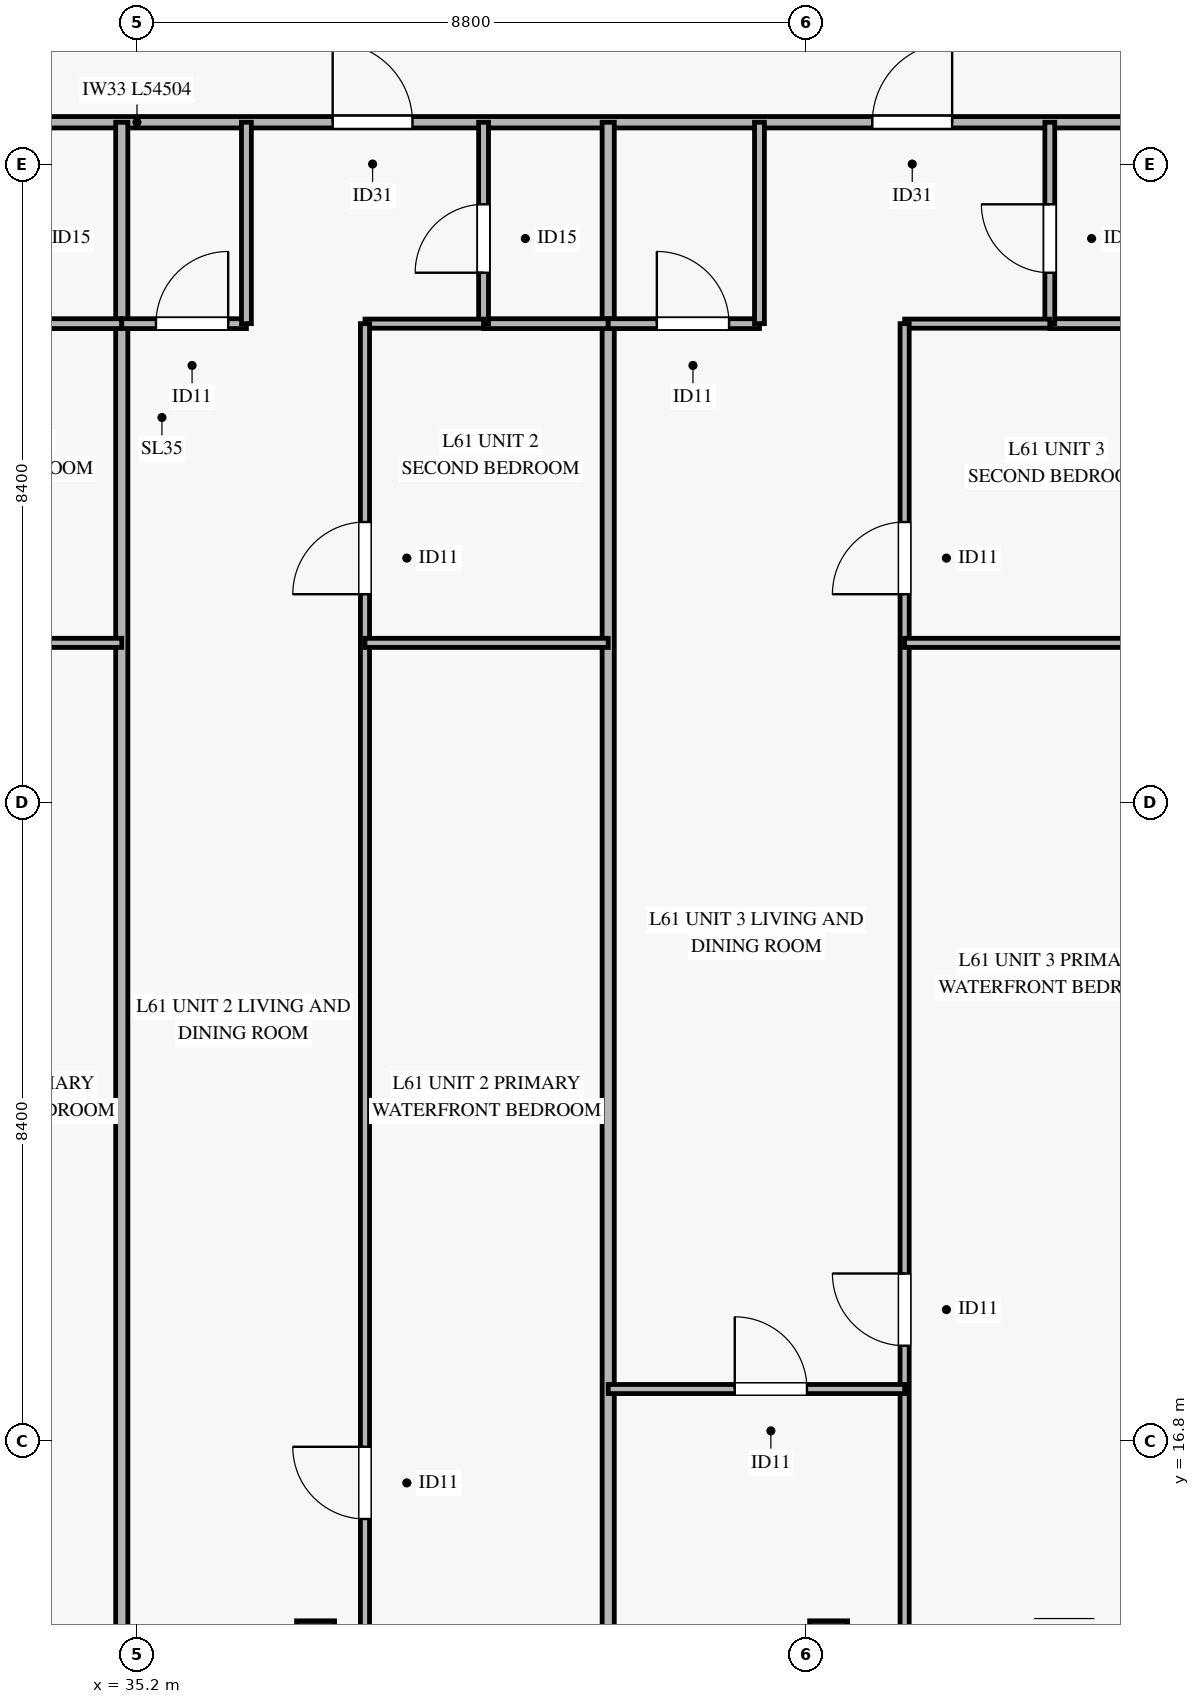
"""IFC4 building model, lengths in metres.
Left out: names, types, materials, properties, quantities, classifications, styles, units other than length and angle.
Written with IfcOpenShell. Run it as: python <this file> out.ifc"""

import sys

from ifc_helpers import new_model, si_unit, direction, frame, frame_2d, origin, origin_2d, place, context, subcontext, project, spatial, rectangle, hollow_rectangle, extrude, source, transform, mapped, element, fill, save


model = new_model("IFC4")
c1 = context("Model", 3, precision=1e-05, world=origin(), true_north=direction((0.0, 1.0)))
c2 = subcontext(c1, "Body", "Model", "MODEL_VIEW")
j1 = project(units=[si_unit("LENGTHUNIT", "METRE"), si_unit("PLANEANGLEUNIT", "RADIAN")], contexts=[c1])
p1 = place(None, origin())
s1 = spatial("IfcSite", under=j1, at=p1, CompositionType="ELEMENT")
p2 = place(p1, origin())
s2 = spatial("IfcBuilding", under=s1, at=p2, CompositionType="ELEMENT")
p3 = place(p2, frame((0.0, 0.0, 241.7)))
s3 = spatial("IfcBuildingStorey", under=s2, at=p3, CompositionType="ELEMENT", Elevation=241.7)
m1 = source(origin(), c2, "Body", "SweptSolid", [
    extrude(hollow_rectangle(XDim=0.5, YDim=0.5, WallThickness=0.024, at=origin_2d()), origin(), (0.0, 0.0, 1.0), 3.185),
])
for number, where, z_axis, x_axis in (
    (1, (37.55, 14.182, 0.0), (0.0, 0.0, 1.0), (1.0, 0.0, 0.0)),
    (2, (44.3, 14.182, 0.0), (0.0, 0.0, 1.0), (1.0, 0.0, 0.0)),
):
    element("IfcColumn", number, at=place(p3, frame(where, z_axis=z_axis, x_axis=x_axis)), inside=s3, PredefinedType="COLUMN", context=c2, shape_type="MappedRepresentation", body=[
        mapped(m1, transform((0.0, 0.0, 0.0), x_axis=(1.0, 0.0, 0.0), y_axis=(0.0, 1.0, 0.0), z_axis=(0.0, 0.0, 1.0), scale=1.0)),
    ])
p4 = place(p3, frame((7.948, 34.15, 0.0), z_axis=(0.0, 0.0, 1.0), x_axis=(1.0, 0.0, 0.0)))
e3 = element("IfcWall", 3, at=p4, inside=s3, PredefinedType="PARTITIONING", context=c2, shape_type="SweptSolid", body=[
    extrude(rectangle(XDim=54.504, YDim=0.15, at=frame_2d((27.252, 0.0))), origin(), (0.0, 0.0, 1.0), 2.47),
])
p5 = place(p4, frame((5.785, 0.0, 0.0)))
e4 = element("IfcOpeningElement", 4, at=p5, cuts=e3, PredefinedType="OPENING", context=c2, shape_type="SweptSolid", body=[
    extrude(rectangle(XDim=1.05, YDim=2.15, at=frame_2d((0.525, 1.075))), frame((0.0, 0.085, 0.0), z_axis=(0.0, -1.0, 0.0), x_axis=(1.0, 0.0, 0.0)), (0.0, 0.0, 1.0), 0.17),
])
p6 = place(p4, frame((16.977, 0.0, 0.0)))
e5 = element("IfcOpeningElement", 5, at=p6, cuts=e3, PredefinedType="OPENING", context=c2, shape_type="SweptSolid", body=[
    extrude(rectangle(XDim=1.05, YDim=2.15, at=frame_2d((0.525, 1.075))), frame((0.0, 0.085, 0.0), z_axis=(0.0, -1.0, 0.0), x_axis=(1.0, 0.0, 0.0)), (0.0, 0.0, 1.0), 0.17),
])
p7 = place(p4, frame((23.427, 0.0, 0.0)))
e6 = element("IfcOpeningElement", 6, at=p7, cuts=e3, PredefinedType="OPENING", context=c2, shape_type="SweptSolid", body=[
    extrude(rectangle(XDim=1.05, YDim=2.15, at=frame_2d((0.525, 1.075))), frame((0.0, 0.085, 0.0), z_axis=(0.0, -1.0, 0.0), x_axis=(1.0, 0.0, 0.0)), (0.0, 0.0, 1.0), 0.17),
])
p8 = place(p4, frame((29.827, 0.0, 0.0)))
e7 = element("IfcOpeningElement", 7, at=p8, cuts=e3, PredefinedType="OPENING", context=c2, shape_type="SweptSolid", body=[
    extrude(rectangle(XDim=1.05, YDim=2.15, at=frame_2d((0.525, 1.075))), frame((0.0, 0.085, 0.0), z_axis=(0.0, -1.0, 0.0), x_axis=(1.0, 0.0, 0.0)), (0.0, 0.0, 1.0), 0.17),
])
p9 = place(p4, frame((36.927, 0.0, 0.0)))
e8 = element("IfcOpeningElement", 8, at=p9, cuts=e3, PredefinedType="OPENING", context=c2, shape_type="SweptSolid", body=[
    extrude(rectangle(XDim=1.05, YDim=2.15, at=frame_2d((0.525, 1.075))), frame((0.0, 0.085, 0.0), z_axis=(0.0, -1.0, 0.0), x_axis=(1.0, 0.0, 0.0)), (0.0, 0.0, 1.0), 0.17),
])
p10 = place(p4, frame((46.381, 0.0, 0.0)))
e9 = element("IfcOpeningElement", 9, at=p10, cuts=e3, PredefinedType="OPENING", context=c2, shape_type="SweptSolid", body=[
    extrude(rectangle(XDim=1.05, YDim=2.15, at=frame_2d((0.525, 1.075))), frame((0.0, 0.085, 0.0), z_axis=(0.0, -1.0, 0.0), x_axis=(1.0, 0.0, 0.0)), (0.0, 0.0, 1.0), 0.17),
])
for number, where, z_axis, x_axis in (
    (10, (35.0, 14.182, 0.0), (0.0, 0.0, 1.0), (0.0, 1.0, 0.0)),
    (11, (41.4, 14.182, 0.0), (0.0, 0.0, 1.0), (0.0, 1.0, 0.0)),
):
    element("IfcWall", number, at=place(p3, frame(where, z_axis=z_axis, x_axis=x_axis)), inside=s3, PredefinedType="PARTITIONING", context=c2, shape_type="SweptSolid", body=[
        extrude(rectangle(XDim=19.968, YDim=0.16, at=frame_2d((9.984, 0.0))), origin(), (0.0, 0.0, 1.0), 2.77),
    ])
p11 = place(p3, frame((33.36, 31.5, 0.0), z_axis=(0.0, 0.0, 1.0), x_axis=(1.0, 0.0, 0.0)))
e12 = element("IfcWall", 12, at=p11, inside=s3, PredefinedType="PARTITIONING", context=c2, shape_type="SweptSolid", body=[
    extrude(rectangle(XDim=1.64, YDim=0.13, at=frame_2d((0.82, 0.0))), origin(), (0.0, 0.0, 1.0), 3.185),
])
p12 = place(p3, frame((31.8, 27.3, 0.0), z_axis=(0.0, 0.0, 1.0), x_axis=(1.0, 0.0, 0.0)))
e13 = element("IfcWall", 13, at=p12, inside=s3, PredefinedType="PARTITIONING", context=c2, shape_type="SweptSolid", body=[
    extrude(rectangle(XDim=3.2, YDim=0.12, at=frame_2d((1.6, 0.0))), origin(), (0.0, 0.0, 1.0), 3.185),
])
p13 = place(p3, frame((35.0, 31.5, 0.0), z_axis=(0.0, 0.0, 1.0), x_axis=(1.0, 0.0, 0.0)))
e14 = element("IfcWall", 14, at=p13, inside=s3, PredefinedType="PARTITIONING", context=c2, shape_type="SweptSolid", body=[
    extrude(rectangle(XDim=1.64, YDim=0.13, at=frame_2d((0.82, 0.0))), origin(), (0.0, 0.0, 1.0), 3.185),
])
p14 = place(p13, frame((0.45, 0.0, 0.0)))
e15 = element("IfcOpeningElement", 15, at=p14, cuts=e14, PredefinedType="OPENING", context=c2, shape_type="SweptSolid", body=[
    extrude(rectangle(XDim=0.95, YDim=2.1, at=frame_2d((0.475, 1.05))), frame((0.0, 0.075, 0.0), z_axis=(0.0, -1.0, 0.0), x_axis=(1.0, 0.0, 0.0)), (0.0, 0.0, 1.0), 0.15),
])
p15 = place(p3, frame((36.64, 31.5, 0.0), z_axis=(0.0, 0.0, 1.0), x_axis=(0.0, 1.0, 0.0)))
e16 = element("IfcWall", 16, at=p15, inside=s3, PredefinedType="PARTITIONING", context=c2, shape_type="SweptSolid", body=[
    extrude(rectangle(XDim=2.65, YDim=0.13, at=frame_2d((1.325, 0.0))), origin(), (0.0, 0.0, 1.0), 2.77),
])
p16 = place(p3, frame((39.76, 31.5, 0.0), z_axis=(0.0, 0.0, 1.0), x_axis=(1.0, 0.0, 0.0)))
e17 = element("IfcWall", 17, at=p16, inside=s3, PredefinedType="PARTITIONING", context=c2, shape_type="SweptSolid", body=[
    extrude(rectangle(XDim=1.64, YDim=0.13, at=frame_2d((0.82, 0.0))), origin(), (0.0, 0.0, 1.0), 3.185),
])
p17 = place(p3, frame((39.76, 31.5, 0.0), z_axis=(0.0, 0.0, 1.0), x_axis=(0.0, 1.0, 0.0)))
e18 = element("IfcWall", 18, at=p17, inside=s3, PredefinedType="PARTITIONING", context=c2, shape_type="SweptSolid", body=[
    extrude(rectangle(XDim=2.65, YDim=0.13, at=frame_2d((1.325, 0.0))), origin(), (0.0, 0.0, 1.0), 2.77),
])
p18 = place(p17, frame((0.67, 0.0, 0.0)))
e19 = element("IfcOpeningElement", 19, at=p18, cuts=e18, PredefinedType="OPENING", context=c2, shape_type="SweptSolid", body=[
    extrude(rectangle(XDim=0.9, YDim=2.1, at=frame_2d((0.45, 1.05))), frame((0.0, 0.075, 0.0), z_axis=(0.0, -1.0, 0.0), x_axis=(1.0, 0.0, 0.0)), (0.0, 0.0, 1.0), 0.15),
])
p19 = place(p3, frame((38.2, 31.5, 0.0), z_axis=(0.0, 0.0, 1.0), x_axis=(1.0, 0.0, 0.0)))
e20 = element("IfcWall", 20, at=p19, inside=s3, PredefinedType="PARTITIONING", context=c2, shape_type="SweptSolid", body=[
    extrude(rectangle(XDim=1.56, YDim=0.12, at=frame_2d((0.78, 0.0))), origin(), (0.0, 0.0, 1.0), 3.185),
])
p20 = place(p3, frame((38.2, 14.182, 0.0), z_axis=(0.0, 0.0, 1.0), x_axis=(0.0, 1.0, 0.0)))
e21 = element("IfcWall", 21, at=p20, inside=s3, PredefinedType="PARTITIONING", context=c2, shape_type="SweptSolid", body=[
    extrude(rectangle(XDim=17.318, YDim=0.12, at=frame_2d((8.659, 0.0))), origin(), (0.0, 0.0, 1.0), 2.77),
])
p21 = place(p20, frame((1.59, 0.0, 0.0)))
e22 = element("IfcOpeningElement", 22, at=p21, cuts=e21, PredefinedType="OPENING", context=c2, shape_type="SweptSolid", body=[
    extrude(rectangle(XDim=0.95, YDim=2.1, at=frame_2d((0.475, 1.05))), frame((0.0, 0.07, 0.0), z_axis=(0.0, -1.0, 0.0), x_axis=(1.0, 0.0, 0.0)), (0.0, 0.0, 1.0), 0.14),
])
p22 = place(p20, frame((13.758, 0.0, 0.0)))
e23 = element("IfcOpeningElement", 23, at=p22, cuts=e21, PredefinedType="OPENING", context=c2, shape_type="SweptSolid", body=[
    extrude(rectangle(XDim=0.95, YDim=2.1, at=frame_2d((0.475, 1.05))), frame((0.0, 0.07, 0.0), z_axis=(0.0, -1.0, 0.0), x_axis=(1.0, 0.0, 0.0)), (0.0, 0.0, 1.0), 0.14),
])
p23 = place(p3, frame((38.2, 27.3, 0.0), z_axis=(0.0, 0.0, 1.0), x_axis=(1.0, 0.0, 0.0)))
e24 = element("IfcWall", 24, at=p23, inside=s3, PredefinedType="PARTITIONING", context=c2, shape_type="SweptSolid", body=[
    extrude(rectangle(XDim=3.2, YDim=0.12, at=frame_2d((1.6, 0.0))), origin(), (0.0, 0.0, 1.0), 3.185),
])
p24 = place(p3, frame((41.4, 31.5, 0.0), z_axis=(0.0, 0.0, 1.0), x_axis=(1.0, 0.0, 0.0)))
e25 = element("IfcWall", 25, at=p24, inside=s3, PredefinedType="PARTITIONING", context=c2, shape_type="SweptSolid", body=[
    extrude(rectangle(XDim=1.99, YDim=0.13, at=frame_2d((0.995, 0.0))), origin(), (0.0, 0.0, 1.0), 3.185),
])
p25 = place(p24, frame((0.64, 0.0, 0.0)))
e26 = element("IfcOpeningElement", 26, at=p25, cuts=e25, PredefinedType="OPENING", context=c2, shape_type="SweptSolid", body=[
    extrude(rectangle(XDim=0.95, YDim=2.1, at=frame_2d((0.475, 1.05))), frame((0.0, 0.075, 0.0), z_axis=(0.0, -1.0, 0.0), x_axis=(1.0, 0.0, 0.0)), (0.0, 0.0, 1.0), 0.15),
])
p26 = place(p3, frame((43.39, 31.5, 0.0), z_axis=(0.0, 0.0, 1.0), x_axis=(0.0, 1.0, 0.0)))
e27 = element("IfcWall", 27, at=p26, inside=s3, PredefinedType="PARTITIONING", context=c2, shape_type="SweptSolid", body=[
    extrude(rectangle(XDim=2.65, YDim=0.13, at=frame_2d((1.325, 0.0))), origin(), (0.0, 0.0, 1.0), 2.77),
])
p27 = place(p3, frame((47.21, 31.5, 0.0), z_axis=(0.0, 0.0, 1.0), x_axis=(1.0, 0.0, 0.0)))
e28 = element("IfcWall", 28, at=p27, inside=s3, PredefinedType="PARTITIONING", context=c2, shape_type="SweptSolid", body=[
    extrude(rectangle(XDim=1.99, YDim=0.13, at=frame_2d((0.995, 0.0))), origin(), (0.0, 0.0, 1.0), 3.185),
])
p28 = place(p3, frame((47.21, 31.5, 0.0), z_axis=(0.0, 0.0, 1.0), x_axis=(0.0, 1.0, 0.0)))
e29 = element("IfcWall", 29, at=p28, inside=s3, PredefinedType="PARTITIONING", context=c2, shape_type="SweptSolid", body=[
    extrude(rectangle(XDim=2.65, YDim=0.13, at=frame_2d((1.325, 0.0))), origin(), (0.0, 0.0, 1.0), 2.77),
])
p29 = place(p28, frame((0.67, 0.0, 0.0)))
e30 = element("IfcOpeningElement", 30, at=p29, cuts=e29, PredefinedType="OPENING", context=c2, shape_type="SweptSolid", body=[
    extrude(rectangle(XDim=0.9, YDim=2.1, at=frame_2d((0.45, 1.05))), frame((0.0, 0.075, 0.0), z_axis=(0.0, -1.0, 0.0), x_axis=(1.0, 0.0, 0.0)), (0.0, 0.0, 1.0), 0.15),
])
p30 = place(p3, frame((45.3, 31.5, 0.0), z_axis=(0.0, 0.0, 1.0), x_axis=(1.0, 0.0, 0.0)))
e31 = element("IfcWall", 31, at=p30, inside=s3, PredefinedType="PARTITIONING", context=c2, shape_type="SweptSolid", body=[
    extrude(rectangle(XDim=1.91, YDim=0.12, at=frame_2d((0.955, 0.0))), origin(), (0.0, 0.0, 1.0), 3.185),
])
p31 = place(p3, frame((45.3, 14.182, 0.0), z_axis=(0.0, 0.0, 1.0), x_axis=(0.0, 1.0, 0.0)))
e32 = element("IfcWall", 32, at=p31, inside=s3, PredefinedType="PARTITIONING", context=c2, shape_type="SweptSolid", body=[
    extrude(rectangle(XDim=17.318, YDim=0.12, at=frame_2d((8.659, 0.0))), origin(), (0.0, 0.0, 1.0), 2.77),
])
p32 = place(p31, frame((3.87, 0.0, 0.0)))
e33 = element("IfcOpeningElement", 33, at=p32, cuts=e32, PredefinedType="OPENING", context=c2, shape_type="SweptSolid", body=[
    extrude(rectangle(XDim=0.95, YDim=2.1, at=frame_2d((0.475, 1.05))), frame((0.0, 0.07, 0.0), z_axis=(0.0, -1.0, 0.0), x_axis=(1.0, 0.0, 0.0)), (0.0, 0.0, 1.0), 0.14),
])
p33 = place(p31, frame((13.758, 0.0, 0.0)))
e34 = element("IfcOpeningElement", 34, at=p33, cuts=e32, PredefinedType="OPENING", context=c2, shape_type="SweptSolid", body=[
    extrude(rectangle(XDim=0.95, YDim=2.1, at=frame_2d((0.475, 1.05))), frame((0.0, 0.07, 0.0), z_axis=(0.0, -1.0, 0.0), x_axis=(1.0, 0.0, 0.0)), (0.0, 0.0, 1.0), 0.14),
])
p34 = place(p3, frame((41.4, 17.482, 0.0), z_axis=(0.0, 0.0, 1.0), x_axis=(1.0, 0.0, 0.0)))
e35 = element("IfcWall", 35, at=p34, inside=s3, PredefinedType="PARTITIONING", context=c2, shape_type="SweptSolid", body=[
    extrude(rectangle(XDim=3.9, YDim=0.12, at=frame_2d((1.95, 0.0))), origin(), (0.0, 0.0, 1.0), 2.47),
])
p35 = place(p34, frame((1.665, 0.0, 0.0)))
e36 = element("IfcOpeningElement", 36, at=p35, cuts=e35, PredefinedType="OPENING", context=c2, shape_type="SweptSolid", body=[
    extrude(rectangle(XDim=0.95, YDim=2.1, at=frame_2d((0.475, 1.05))), frame((0.0, 0.07, 0.0), z_axis=(0.0, -1.0, 0.0), x_axis=(1.0, 0.0, 0.0)), (0.0, 0.0, 1.0), 0.14),
])
p36 = place(p3, frame((45.3, 27.3, 0.0), z_axis=(0.0, 0.0, 1.0), x_axis=(1.0, 0.0, 0.0)))
e37 = element("IfcWall", 37, at=p36, inside=s3, PredefinedType="PARTITIONING", context=c2, shape_type="SweptSolid", body=[
    extrude(rectangle(XDim=3.9, YDim=0.12, at=frame_2d((1.95, 0.0))), origin(), (0.0, 0.0, 1.0), 3.185),
])
m2 = source(origin(), c2, "Body", "SweptSolid", [
    extrude(rectangle(XDim=1.05, YDim=2.15, at=frame_2d((0.525, 1.075))), frame((0.0, 0.025, 0.0), z_axis=(0.0, -1.0, 0.0), x_axis=(1.0, 0.0, 0.0)), (0.0, 0.0, 1.0), 0.05),
])
p37 = place(p8, origin())
e38 = element("IfcDoor", 38, at=p37, inside=s3, OperationType="SINGLE_SWING_LEFT", PredefinedType="DOOR", context=c2, shape_type="MappedRepresentation", body=[
    mapped(m2, transform((0.0, 0.0, 0.0), x_axis=(1.0, 0.0, 0.0), y_axis=(0.0, 1.0, 0.0), z_axis=(0.0, 0.0, 1.0), scale=1.0)),
])
fill(e7, e38)
m3 = source(origin(), c2, "Body", "SweptSolid", [
    extrude(rectangle(XDim=0.95, YDim=2.1, at=frame_2d((0.475, 1.05))), frame((0.0, 0.025, 0.0), z_axis=(0.0, -1.0, 0.0), x_axis=(1.0, 0.0, 0.0)), (0.0, 0.0, 1.0), 0.05),
])
p38 = place(p14, origin())
e39 = element("IfcDoor", 39, at=p38, inside=s3, OperationType="SINGLE_SWING_RIGHT", PredefinedType="DOOR", context=c2, shape_type="MappedRepresentation", body=[
    mapped(m3, transform((0.0, 0.0, 0.0), x_axis=(1.0, 0.0, 0.0), y_axis=(0.0, 1.0, 0.0), z_axis=(0.0, 0.0, 1.0), scale=1.0)),
])
fill(e15, e39)
m4 = source(origin(), c2, "Body", "SweptSolid", [
    extrude(rectangle(XDim=0.9, YDim=2.1, at=frame_2d((0.45, 1.05))), frame((0.0, 0.025, 0.0), z_axis=(0.0, -1.0, 0.0), x_axis=(1.0, 0.0, 0.0)), (0.0, 0.0, 1.0), 0.05),
])
p39 = place(p18, origin())
e40 = element("IfcDoor", 40, at=p39, inside=s3, OperationType="SINGLE_SWING_LEFT", PredefinedType="DOOR", context=c2, shape_type="MappedRepresentation", body=[
    mapped(m4, transform((0.0, 0.0, 0.0), x_axis=(1.0, 0.0, 0.0), y_axis=(0.0, 1.0, 0.0), z_axis=(0.0, 0.0, 1.0), scale=1.0)),
])
fill(e19, e40)
p40 = place(p21, origin())
e41 = element("IfcDoor", 41, at=p40, inside=s3, OperationType="SINGLE_SWING_RIGHT", PredefinedType="DOOR", context=c2, shape_type="MappedRepresentation", body=[
    mapped(m3, transform((0.0, 0.0, 0.0), x_axis=(1.0, 0.0, 0.0), y_axis=(0.0, 1.0, 0.0), z_axis=(0.0, 0.0, 1.0), scale=1.0)),
])
fill(e22, e41)
p41 = place(p22, origin())
e42 = element("IfcDoor", 42, at=p41, inside=s3, OperationType="SINGLE_SWING_LEFT", PredefinedType="DOOR", context=c2, shape_type="MappedRepresentation", body=[
    mapped(m3, transform((0.0, 0.0, 0.0), x_axis=(1.0, 0.0, 0.0), y_axis=(0.0, 1.0, 0.0), z_axis=(0.0, 0.0, 1.0), scale=1.0)),
])
fill(e23, e42)
p42 = place(p9, origin())
e43 = element("IfcDoor", 43, at=p42, inside=s3, OperationType="SINGLE_SWING_RIGHT", PredefinedType="DOOR", context=c2, shape_type="MappedRepresentation", body=[
    mapped(m2, transform((0.0, 0.0, 0.0), x_axis=(1.0, 0.0, 0.0), y_axis=(0.0, 1.0, 0.0), z_axis=(0.0, 0.0, 1.0), scale=1.0)),
])
fill(e8, e43)
p43 = place(p25, origin())
e44 = element("IfcDoor", 44, at=p43, inside=s3, OperationType="SINGLE_SWING_LEFT", PredefinedType="DOOR", context=c2, shape_type="MappedRepresentation", body=[
    mapped(m3, transform((0.0, 0.0, 0.0), x_axis=(1.0, 0.0, 0.0), y_axis=(0.0, 1.0, 0.0), z_axis=(0.0, 0.0, 1.0), scale=1.0)),
])
fill(e26, e44)
p44 = place(p29, origin())
e45 = element("IfcDoor", 45, at=p44, inside=s3, OperationType="SINGLE_SWING_RIGHT", PredefinedType="DOOR", context=c2, shape_type="MappedRepresentation", body=[
    mapped(m4, transform((0.0, 0.0, 0.0), x_axis=(1.0, 0.0, 0.0), y_axis=(0.0, 1.0, 0.0), z_axis=(0.0, 0.0, 1.0), scale=1.0)),
])
fill(e30, e45)
p45 = place(p35, origin())
e46 = element("IfcDoor", 46, at=p45, inside=s3, OperationType="SINGLE_SWING_LEFT", PredefinedType="DOOR", context=c2, shape_type="MappedRepresentation", body=[
    mapped(m3, transform((0.0, 0.0, 0.0), x_axis=(1.0, 0.0, 0.0), y_axis=(0.0, 1.0, 0.0), z_axis=(0.0, 0.0, 1.0), scale=1.0)),
])
fill(e36, e46)
p46 = place(p32, origin())
e47 = element("IfcDoor", 47, at=p46, inside=s3, OperationType="SINGLE_SWING_RIGHT", PredefinedType="DOOR", context=c2, shape_type="MappedRepresentation", body=[
    mapped(m3, transform((0.0, 0.0, 0.0), x_axis=(1.0, 0.0, 0.0), y_axis=(0.0, 1.0, 0.0), z_axis=(0.0, 0.0, 1.0), scale=1.0)),
])
fill(e33, e47)
p47 = place(p33, origin())
e48 = element("IfcDoor", 48, at=p47, inside=s3, OperationType="SINGLE_SWING_LEFT", PredefinedType="DOOR", context=c2, shape_type="MappedRepresentation", body=[
    mapped(m3, transform((0.0, 0.0, 0.0), x_axis=(1.0, 0.0, 0.0), y_axis=(0.0, 1.0, 0.0), z_axis=(0.0, 0.0, 1.0), scale=1.0)),
])
fill(e34, e48)
save(model, sys.argv[1])
